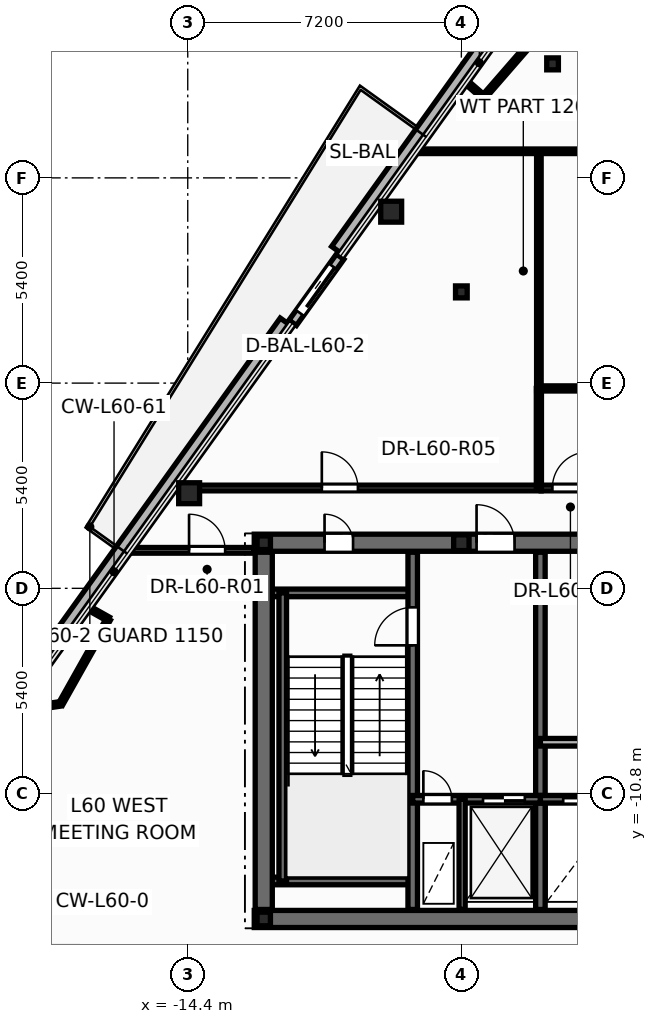
"""IFC4 building model, lengths in metres.
Left out: names, types, materials, properties, quantities, classifications, styles, units other than length and angle.
Written with IfcOpenShell. Run it as: python <this file> out.ifc"""

import sys

from ifc_helpers import new_model, si_unit, direction, frame, frame_2d, origin, origin_2d, place, context, subcontext, project, spatial, rectangle, hollow_circle, i_section, extrude, element, fill, save


model = new_model("IFC4")
c1 = context("Model", 3, precision=1e-05, world=origin(), true_north=direction((0.0, 1.0)))
c2 = subcontext(c1, "Body", "Model", "MODEL_VIEW")
j1 = project(units=[si_unit("LENGTHUNIT", "METRE"), si_unit("PLANEANGLEUNIT", "RADIAN")], contexts=[c1])
p1 = place(None, origin())
s1 = spatial("IfcSite", under=j1, at=p1, CompositionType="ELEMENT")
p2 = place(p1, origin())
s2 = spatial("IfcBuilding", under=s1, at=p2, CompositionType="ELEMENT")
p3 = place(p2, frame((0.0, 0.0, 228.9)))
s3 = spatial("IfcBuildingStorey", under=s2, at=p3, CompositionType="ELEMENT", Elevation=228.9)
for number, where, z_axis, x_axis in (
    (1, (-9.046, 4.51, 0.0), (0.0, 0.0, 1.0), (1.0, 0.0, 0.0)),
    (2, (-14.363, -2.897, 0.0), (0.0, 0.0, 1.0), (1.0, 0.0, 0.0)),
):
    element("IfcColumn", number, at=place(p3, frame(where, z_axis=z_axis, x_axis=x_axis)), inside=s3, PredefinedType="COLUMN", context=c2, shape_type="SweptSolid", body=[
        extrude(hollow_circle(Radius=0.275, WallThickness=0.024, at=origin_2d()), origin(), (0.0, 0.0, 1.0), 4.5),
    ])
for number, where, z_axis, x_axis in (
    (3, (-12.4, -14.1, 0.0), (0.0, 0.0, 1.0), (1.0, 0.0, 0.0)),
    (4, (-12.4, -4.2, 0.0), (0.0, 0.0, 1.0), (1.0, 0.0, 0.0)),
):
    element("IfcColumn", number, at=place(p3, frame(where, z_axis=z_axis, x_axis=x_axis)), inside=s3, PredefinedType="COLUMN", context=c2, shape_type="SweptSolid", body=[
        extrude(i_section(OverallWidth=0.352, OverallDepth=0.359, WebThickness=0.018, FlangeThickness=0.026, at=origin_2d()), origin(), (0.0, 0.0, 1.0), 4.5),
    ])
p4 = place(p3, frame((-7.2, -4.2, 0.0), z_axis=(0.0, 0.0, 1.0), x_axis=(1.0, 0.0, 0.0)))
e5 = element("IfcColumn", 5, at=p4, inside=s3, PredefinedType="PILASTER", context=c2, shape_type="SweptSolid", body=[
    extrude(i_section(OverallWidth=0.405, OverallDepth=0.414, WebThickness=0.022, FlangeThickness=0.032, at=origin_2d()), origin(), (0.0, 0.0, 1.0), 4.5),
])
for number, where, z_axis, x_axis in (
    (6, (-7.2, 2.4, 0.0), (0.0, 0.0, 1.0), (1.0, 0.0, 0.0)),
    (7, (-4.8, 8.4, 0.0), (0.0, 0.0, 1.0), (1.0, 0.0, 0.0)),
):
    element("IfcColumn", number, at=place(p3, frame(where, z_axis=z_axis, x_axis=x_axis)), inside=s3, PredefinedType="COLUMN", context=c2, shape_type="SweptSolid", body=[
        extrude(i_section(OverallWidth=0.307, OverallDepth=0.314, WebThickness=0.012, FlangeThickness=0.019, at=origin_2d()), origin(), (0.0, 0.0, 1.0), 4.5),
    ])
p5 = place(p3, frame((-3.248, 13.549, -0.2), z_axis=(0.0, 0.0, 1.0), x_axis=(-0.583104007924, -0.81239751104, 0.0)))
e8 = element("IfcWall", 8, at=p5, inside=s3, PredefinedType="PARAPET", context=c2, shape_type="SweptSolid", body=[
    extrude(rectangle(XDim=12.38, YDim=0.36, at=frame_2d((6.19, 0.0))), origin(), (0.0, 0.0, 1.0), 0.38),
])
p6 = place(p3, frame((-11.82, 1.607, -0.2), z_axis=(0.0, 0.0, 1.0), x_axis=(-0.58311922958, -0.812386585373, 0.0)))
e9 = element("IfcWall", 9, at=p6, inside=s3, PredefinedType="PARAPET", context=c2, shape_type="SweptSolid", body=[
    extrude(rectangle(XDim=15.948, YDim=0.36, at=frame_2d((7.974, 0.0))), origin(), (0.0, 0.0, 1.0), 0.38),
])
p7 = place(p3, frame((-10.39, 3.325, -0.015), z_axis=(0.0, 0.0, 1.0), x_axis=(-0.583092889468, -0.812405491274, 0.0)))
e10 = element("IfcWall", 10, at=p7, inside=s3, PredefinedType="STANDARD", context=c2, shape_type="SweptSolid", body=[
    extrude(rectangle(XDim=2.14, YDim=0.24, at=frame_2d((1.07, 0.0))), origin(), (0.0, 0.0, 1.0), 3.778),
])
p8 = place(p7, frame((0.32, 0.0, 0.015)))
e11 = element("IfcOpeningElement", 11, at=p8, cuts=e10, PredefinedType="OPENING", context=c2, shape_type="SweptSolid", body=[
    extrude(rectangle(XDim=1.506, YDim=2.204, at=frame_2d((0.75, 1.102))), frame((0.0, 0.13, 0.0), z_axis=(0.0, -1.0, 0.0), x_axis=(1.0, 0.0, 0.0)), (0.0, 0.0, 1.0), 0.26),
])
p9 = place(p3, frame((-12.65, -14.1, 0.0), z_axis=(0.0, 0.0, 1.0), x_axis=(1.0, 0.0, 0.0)))
e12 = element("IfcWall", 12, at=p9, inside=s3, PredefinedType="SHEAR", context=c2, shape_type="SweptSolid", body=[
    extrude(rectangle(XDim=25.3, YDim=0.45, at=frame_2d((12.65, 0.0))), origin(), (0.0, 0.0, 1.0), 4.5),
])
p10 = place(p3, frame((-12.65, -4.2, 0.0), z_axis=(0.0, 0.0, 1.0), x_axis=(1.0, 0.0, 0.0)))
e13 = element("IfcWall", 13, at=p10, inside=s3, PredefinedType="SHEAR", context=c2, shape_type="SweptSolid", body=[
    extrude(rectangle(XDim=25.3, YDim=0.45, at=frame_2d((12.65, 0.0))), origin(), (0.0, 0.0, 1.0), 4.5),
])
p11 = place(p10, frame((1.85, 0.0, 0.0)))
e14 = element("IfcOpeningElement", 14, at=p11, cuts=e13, PredefinedType="OPENING", context=c2, shape_type="SweptSolid", body=[
    extrude(rectangle(XDim=0.756, YDim=2.054, at=frame_2d((0.375, 1.027))), frame((0.0, 0.235, 0.0), z_axis=(0.0, -1.0, 0.0), x_axis=(1.0, 0.0, 0.0)), (0.0, 0.0, 1.0), 0.47),
])
p12 = place(p10, frame((22.65, 0.0, 0.0)))
e15 = element("IfcOpeningElement", 15, at=p12, cuts=e13, PredefinedType="OPENING", context=c2, shape_type="SweptSolid", body=[
    extrude(rectangle(XDim=0.756, YDim=2.054, at=frame_2d((0.375, 1.027))), frame((0.0, 0.235, 0.0), z_axis=(0.0, -1.0, 0.0), x_axis=(1.0, 0.0, 0.0)), (0.0, 0.0, 1.0), 0.47),
])
p13 = place(p10, frame((5.85, 0.0, 0.0)))
e16 = element("IfcOpeningElement", 16, at=p13, cuts=e13, PredefinedType="OPENING", context=c2, shape_type="SweptSolid", body=[
    extrude(rectangle(XDim=1.006, YDim=2.104, at=frame_2d((0.5, 1.052))), frame((0.0, 0.235, 0.0), z_axis=(0.0, -1.0, 0.0), x_axis=(1.0, 0.0, 0.0)), (0.0, 0.0, 1.0), 0.47),
])
p14 = place(p10, frame((10.35, 0.0, 0.0)))
e17 = element("IfcOpeningElement", 17, at=p14, cuts=e13, PredefinedType="OPENING", context=c2, shape_type="SweptSolid", body=[
    extrude(rectangle(XDim=1.406, YDim=2.154, at=frame_2d((0.7, 1.077))), frame((0.0, 0.235, 0.0), z_axis=(0.0, -1.0, 0.0), x_axis=(1.0, 0.0, 0.0)), (0.0, 0.0, 1.0), 0.47),
])
p15 = place(p10, frame((18.45, 0.0, 0.0)))
e18 = element("IfcOpeningElement", 18, at=p15, cuts=e13, PredefinedType="OPENING", context=c2, shape_type="SweptSolid", body=[
    extrude(rectangle(XDim=1.006, YDim=2.104, at=frame_2d((0.5, 1.052))), frame((0.0, 0.235, 0.0), z_axis=(0.0, -1.0, 0.0), x_axis=(1.0, 0.0, 0.0)), (0.0, 0.0, 1.0), 0.47),
])
for number, where, z_axis, x_axis in (
    (19, (-12.35, -5.52, 0.0), (0.0, 0.0, 1.0), (1.0, 0.0, 0.0)),
    (20, (-12.35, -13.1, 0.0), (0.0, 0.0, 1.0), (1.0, 0.0, 0.0)),
):
    element("IfcWall", number, at=place(p3, frame(where, z_axis=z_axis, x_axis=x_axis)), inside=s3, PredefinedType="SOLIDWALL", context=c2, shape_type="SweptSolid", body=[
        extrude(rectangle(XDim=3.87, YDim=0.2, at=frame_2d((1.935, 0.0))), origin(), (0.0, 0.0, 1.0), 4.5),
    ])
p16 = place(p3, frame((-11.9, -13.1, 0.0), z_axis=(0.0, 0.0, 1.0), x_axis=(0.0, 1.0, 0.0)))
e21 = element("IfcWall", 21, at=p16, inside=s3, PredefinedType="SOLIDWALL", context=c2, shape_type="SweptSolid", body=[
    extrude(rectangle(XDim=7.58, YDim=0.2, at=frame_2d((3.79, 0.0))), origin(), (0.0, 0.0, 1.0), 4.5),
])
p17 = place(p3, frame((-8.48, -13.85, 0.0), z_axis=(0.0, 0.0, 1.0), x_axis=(0.0, 1.0, 0.0)))
e22 = element("IfcWall", 22, at=p17, inside=s3, PredefinedType="SHEAR", context=c2, shape_type="SweptSolid", body=[
    extrude(rectangle(XDim=9.4, YDim=0.25, at=frame_2d((4.7, 0.0))), origin(), (0.0, 0.0, 1.0), 4.5),
])
p18 = place(p17, frame((6.95, 0.0, 0.0)))
e23 = element("IfcOpeningElement", 23, at=p18, cuts=e22, PredefinedType="OPENING", context=c2, shape_type="SweptSolid", body=[
    extrude(rectangle(XDim=1.006, YDim=2.104, at=frame_2d((0.5, 1.052))), frame((0.0, 0.135, 0.0), z_axis=(0.0, -1.0, 0.0), x_axis=(1.0, 0.0, 0.0)), (0.0, 0.0, 1.0), 0.27),
])
p19 = place(p3, frame((-5.12, -13.85, 0.0), z_axis=(0.0, 0.0, 1.0), x_axis=(0.0, 1.0, 0.0)))
e24 = element("IfcWall", 24, at=p19, inside=s3, PredefinedType="SHEAR", context=c2, shape_type="SweptSolid", body=[
    extrude(rectangle(XDim=9.4, YDim=0.25, at=frame_2d((4.7, 0.0))), origin(), (0.0, 0.0, 1.0), 4.5),
])
p20 = place(p3, frame((-8.48, -10.95, 0.0), z_axis=(0.0, 0.0, 1.0), x_axis=(1.0, 0.0, 0.0)))
e25 = element("IfcWall", 25, at=p20, inside=s3, PredefinedType="SOLIDWALL", context=c2, shape_type="SweptSolid", body=[
    extrude(rectangle(XDim=3.36, YDim=0.2, at=frame_2d((1.68, 0.0))), origin(), (0.0, 0.0, 1.0), 4.5),
])
p21 = place(p20, frame((0.28, 0.0, 0.0)))
e26 = element("IfcOpeningElement", 26, at=p21, cuts=e25, PredefinedType="OPENING", context=c2, shape_type="SweptSolid", body=[
    extrude(rectangle(XDim=0.756, YDim=2.054, at=frame_2d((0.375, 1.027))), frame((0.0, 0.11, 0.0), z_axis=(0.0, -1.0, 0.0), x_axis=(1.0, 0.0, 0.0)), (0.0, 0.0, 1.0), 0.22),
])
p22 = place(p20, frame((1.85, 0.0, 0.0)))
e27 = element("IfcOpeningElement", 27, at=p22, cuts=e25, PredefinedType="OPENING", context=c2, shape_type="SweptSolid", body=[
    extrude(rectangle(XDim=1.106, YDim=2.104, at=frame_2d((0.55, 1.052))), frame((0.0, 0.11, 0.0), z_axis=(0.0, -1.0, 0.0), x_axis=(1.0, 0.0, 0.0)), (0.0, 0.0, 1.0), 0.22),
])
p23 = place(p3, frame((-5.12, -10.95, 0.0), z_axis=(0.0, 0.0, 1.0), x_axis=(1.0, 0.0, 0.0)))
e28 = element("IfcWall", 28, at=p23, inside=s3, PredefinedType="SOLIDWALL", context=c2, shape_type="SweptSolid", body=[
    extrude(rectangle(XDim=10.24, YDim=0.2, at=frame_2d((5.12, 0.0))), origin(), (0.0, 0.0, 1.0), 4.5),
])
p24 = place(p23, frame((0.6, 0.0, 0.0)))
e29 = element("IfcOpeningElement", 29, at=p24, cuts=e28, PredefinedType="OPENING", context=c2, shape_type="SweptSolid", body=[
    extrude(rectangle(XDim=1.106, YDim=2.104, at=frame_2d((0.55, 1.052))), frame((0.0, 0.11, 0.0), z_axis=(0.0, -1.0, 0.0), x_axis=(1.0, 0.0, 0.0)), (0.0, 0.0, 1.0), 0.22),
])
p25 = place(p23, frame((2.67, 0.0, 0.0)))
e30 = element("IfcOpeningElement", 30, at=p25, cuts=e28, PredefinedType="OPENING", context=c2, shape_type="SweptSolid", body=[
    extrude(rectangle(XDim=1.106, YDim=2.104, at=frame_2d((0.55, 1.052))), frame((0.0, 0.11, 0.0), z_axis=(0.0, -1.0, 0.0), x_axis=(1.0, 0.0, 0.0)), (0.0, 0.0, 1.0), 0.22),
])
p26 = place(p23, frame((4.57, 0.0, 0.0)))
e31 = element("IfcOpeningElement", 31, at=p26, cuts=e28, PredefinedType="OPENING", context=c2, shape_type="SweptSolid", body=[
    extrude(rectangle(XDim=1.106, YDim=2.104, at=frame_2d((0.55, 1.052))), frame((0.0, 0.11, 0.0), z_axis=(0.0, -1.0, 0.0), x_axis=(1.0, 0.0, 0.0)), (0.0, 0.0, 1.0), 0.22),
])
p27 = place(p23, frame((6.47, 0.0, 0.0)))
e32 = element("IfcOpeningElement", 32, at=p27, cuts=e28, PredefinedType="OPENING", context=c2, shape_type="SweptSolid", body=[
    extrude(rectangle(XDim=1.106, YDim=2.104, at=frame_2d((0.55, 1.052))), frame((0.0, 0.11, 0.0), z_axis=(0.0, -1.0, 0.0), x_axis=(1.0, 0.0, 0.0)), (0.0, 0.0, 1.0), 0.22),
])
p28 = place(p23, frame((8.54, 0.0, 0.0)))
e33 = element("IfcOpeningElement", 33, at=p28, cuts=e28, PredefinedType="OPENING", context=c2, shape_type="SweptSolid", body=[
    extrude(rectangle(XDim=1.106, YDim=2.104, at=frame_2d((0.55, 1.052))), frame((0.0, 0.11, 0.0), z_axis=(0.0, -1.0, 0.0), x_axis=(1.0, 0.0, 0.0)), (0.0, 0.0, 1.0), 0.22),
])
p29 = place(p3, frame((-7.18, -13.85, 0.0), z_axis=(0.0, 0.0, 1.0), x_axis=(0.0, 1.0, 0.0)))
e34 = element("IfcWall", 34, at=p29, inside=s3, PredefinedType="PARTITIONING", context=c2, shape_type="SweptSolid", body=[
    extrude(rectangle(XDim=2.9, YDim=0.16, at=frame_2d((1.45, 0.0))), origin(), (0.0, 0.0, 1.0), 3.47),
])
p30 = place(p3, frame((-12.4, -13.85, 0.0), z_axis=(0.0, 0.0, 1.0), x_axis=(0.0, 1.0, 0.0)))
e35 = element("IfcWall", 35, at=p30, inside=s3, PredefinedType="SHEAR", context=c2, shape_type="SweptSolid", body=[
    extrude(rectangle(XDim=9.4, YDim=0.45, at=frame_2d((4.7, 0.0))), origin(), (0.0, 0.0, 1.0), 4.5),
])
p31 = place(p3, frame((-5.12, -9.45, 0.0), z_axis=(0.0, 0.0, 1.0), x_axis=(1.0, 0.0, 0.0)))
e36 = element("IfcWall", 36, at=p31, inside=s3, PredefinedType="SOLIDWALL", context=c2, shape_type="SweptSolid", body=[
    extrude(rectangle(XDim=2.24, YDim=0.2, at=frame_2d((1.12, 0.0))), origin(), (0.0, 0.0, 1.0), 4.245),
])
p32 = place(p3, frame((-14.757, -2.76, 0.0), z_axis=(0.0, 0.0, 1.0), x_axis=(1.0, 0.0, 0.0)))
e37 = element("IfcWall", 37, at=p32, inside=s3, PredefinedType="PARTITIONING", context=c2, shape_type="SweptSolid", body=[
    extrude(rectangle(XDim=9.657, YDim=0.15, at=frame_2d((4.829, 0.0))), origin(), (0.0, 0.0, 1.0), 3.22),
])
p33 = place(p32, frame((3.885, 0.0, 0.0)))
e38 = element("IfcOpeningElement", 38, at=p33, cuts=e37, PredefinedType="OPENING", context=c2, shape_type="SweptSolid", body=[
    extrude(rectangle(XDim=0.956, YDim=2.104, at=frame_2d((0.475, 1.052))), frame((0.0, 0.085, 0.0), z_axis=(0.0, -1.0, 0.0), x_axis=(1.0, 0.0, 0.0)), (0.0, 0.0, 1.0), 0.17),
])
p34 = place(p3, frame((-5.16, -0.2, 0.0), z_axis=(0.0, 0.0, 1.0), x_axis=(0.0, 1.0, 0.0)))
e39 = element("IfcWall", 39, at=p34, inside=s3, PredefinedType="PARTITIONING", context=c2, shape_type="SweptSolid", body=[
    extrude(rectangle(XDim=6.3, YDim=0.12, at=frame_2d((3.15, 0.0))), origin(), (0.0, 0.0, 1.0), 3.22),
])
p35 = place(p3, frame((-15.935, -4.4, 0.0), z_axis=(0.0, 0.0, 1.0), x_axis=(1.0, 0.0, 0.0)))
e40 = element("IfcWall", 40, at=p35, inside=s3, PredefinedType="PARTITIONING", context=c2, shape_type="SweptSolid", body=[
    extrude(rectangle(XDim=3.282, YDim=0.15, at=frame_2d((1.641, 0.0))), origin(), (0.0, 0.0, 1.0), 3.22),
])
p36 = place(p35, frame((1.569, 0.0, 0.0)))
e41 = element("IfcOpeningElement", 41, at=p36, cuts=e40, PredefinedType="OPENING", context=c2, shape_type="SweptSolid", body=[
    extrude(rectangle(XDim=0.956, YDim=2.104, at=frame_2d((0.475, 1.052))), frame((0.0, 0.085, 0.0), z_axis=(0.0, -1.0, 0.0), x_axis=(1.0, 0.0, 0.0)), (0.0, 0.0, 1.0), 0.17),
])
p37 = place(p3, frame((-8.398, 6.1, 0.0), z_axis=(0.0, 0.0, 1.0), x_axis=(1.0, 0.0, 0.0)))
e42 = element("IfcWall", 42, at=p37, inside=s3, PredefinedType="PARTITIONING", context=c2, shape_type="SweptSolid", body=[
    extrude(rectangle(XDim=6.038, YDim=0.12, at=frame_2d((3.019, 0.0))), origin(), (0.0, 0.0, 1.0), 3.22),
])
p38 = place(p3, frame((-5.098, -2.76, 0.0), z_axis=(0.0, 0.0, 1.0), x_axis=(1.0, 0.0, 0.0)))
e43 = element("IfcWall", 43, at=p38, inside=s3, PredefinedType="PARTITIONING", context=c2, shape_type="SweptSolid", body=[
    extrude(rectangle(XDim=2.738, YDim=0.15, at=frame_2d((1.369, 0.0))), origin(), (0.0, 0.0, 1.0), 3.865),
])
p39 = place(p38, frame((0.293, 0.0, 0.0)))
e44 = element("IfcOpeningElement", 44, at=p39, cuts=e43, PredefinedType="OPENING", context=c2, shape_type="SweptSolid", body=[
    extrude(rectangle(XDim=0.956, YDim=2.104, at=frame_2d((0.475, 1.052))), frame((0.0, 0.085, 0.0), z_axis=(0.0, -1.0, 0.0), x_axis=(1.0, 0.0, 0.0)), (0.0, 0.0, 1.0), 0.17),
])
p40 = place(p3, frame((-5.16, -0.14, 0.0), z_axis=(0.0, 0.0, 1.0), x_axis=(1.0, 0.0, 0.0)))
e45 = element("IfcWall", 45, at=p40, inside=s3, PredefinedType="PARTITIONING", context=c2, shape_type="SweptSolid", body=[
    extrude(rectangle(XDim=2.8, YDim=0.135, at=frame_2d((1.4, 0.0))), origin(), (0.0, 0.0, 1.0), 3.865),
])
p41 = place(p3, frame((-4.865, 9.537, 0.0), z_axis=(0.0, 0.0, 1.0), x_axis=(-0.656083508216, -0.754688300059, 0.0)))
e46 = element("IfcWall", 46, at=p41, inside=s3, PredefinedType="PARTITIONING", context=c2, shape_type="SweptSolid", body=[
    extrude(rectangle(XDim=2.667, YDim=0.12, at=frame_2d((1.333, 0.0))), origin(), (0.0, 0.0, 1.0), 4.245),
])
p42 = place(p3, frame((-5.16, -2.76, 0.0), z_axis=(0.0, 0.0, 1.0), x_axis=(0.0, 1.0, 0.0)))
e47 = element("IfcWall", 47, at=p42, inside=s3, PredefinedType="PARTITIONING", context=c2, shape_type="SweptSolid", body=[
    extrude(rectangle(XDim=2.62, YDim=0.135, at=frame_2d((1.31, 0.0))), origin(), (0.0, 0.0, 1.0), 4.245),
])
p43 = place(p3, frame((-16.488, -6.21, 0.0), z_axis=(0.0, 0.0, 1.0), x_axis=(-0.490329227995, -0.87153729018, 0.0)))
e48 = element("IfcWall", 48, at=p43, inside=s3, PredefinedType="PARTITIONING", context=c2, shape_type="SweptSolid", body=[
    extrude(rectangle(XDim=2.557, YDim=0.12, at=frame_2d((1.279, 0.0))), origin(), (0.0, 0.0, 1.0), 4.245),
])
p44 = place(p3, frame((-17.742, -8.439, 0.0), z_axis=(0.0, 0.0, 1.0), x_axis=(-0.989322448528, -0.145743242855, 0.0)))
e49 = element("IfcWall", 49, at=p44, inside=s3, PredefinedType="PARTITIONING", context=c2, shape_type="SweptSolid", body=[
    extrude(rectangle(XDim=0.846, YDim=0.12, at=frame_2d((0.423, 0.0))), origin(), (0.0, 0.0, 1.0), 3.763),
])
p45 = place(p3, frame((-6.615, 7.524, 0.0), z_axis=(0.0, 0.0, 1.0), x_axis=(-0.754777719291, 0.655980635737, 0.0)))
e50 = element("IfcWall", 50, at=p45, inside=s3, PredefinedType="PARTITIONING", context=c2, shape_type="SweptSolid", body=[
    extrude(rectangle(XDim=0.61, YDim=0.12, at=frame_2d((0.305, 0.0))), origin(), (0.0, 0.0, 1.0), 3.763),
])
p46 = place(p3, frame((-17.01, -5.916, 0.0), z_axis=(0.0, 0.0, 1.0), x_axis=(0.871532028392, -0.49033858046, 0.0)))
e51 = element("IfcWall", 51, at=p46, inside=s3, PredefinedType="PARTITIONING", context=c2, shape_type="SweptSolid", body=[
    extrude(rectangle(XDim=0.599, YDim=0.12, at=frame_2d((0.3, 0.0))), origin(), (0.0, 0.0, 1.0), 3.763),
])
p47 = place(p8, origin())
e52 = element("IfcDoor", 52, at=p47, inside=s3, OperationType="SLIDING_TO_RIGHT", PredefinedType="DOOR", context=c2, shape_type="SweptSolid", body=[
    extrude(rectangle(XDim=1.5, YDim=2.2, at=frame_2d((0.75, 1.1))), frame((0.0, 0.025, 0.0), z_axis=(0.0, -1.0, 0.0), x_axis=(1.0, 0.0, 0.0)), (0.0, 0.0, 1.0), 0.05),
])
fill(e11, e52)
p48 = place(p18, origin())
e53 = element("IfcDoor", 53, at=p48, inside=s3, OperationType="SINGLE_SWING_LEFT", PredefinedType="DOOR", context=c2, shape_type="SweptSolid", body=[
    extrude(rectangle(XDim=1.0, YDim=2.1, at=frame_2d((0.5, 1.05))), frame((0.0, 0.025, 0.0), z_axis=(0.0, -1.0, 0.0), x_axis=(1.0, 0.0, 0.0)), (0.0, 0.0, 1.0), 0.05),
])
fill(e23, e53)
p49 = place(p21, origin())
e54 = element("IfcDoor", 54, at=p49, inside=s3, OperationType="SINGLE_SWING_LEFT", PredefinedType="DOOR", context=c2, shape_type="SweptSolid", body=[
    extrude(rectangle(XDim=0.75, YDim=2.05, at=frame_2d((0.375, 1.025))), frame((0.0, 0.025, 0.0), z_axis=(0.0, -1.0, 0.0), x_axis=(1.0, 0.0, 0.0)), (0.0, 0.0, 1.0), 0.05),
])
fill(e26, e54)
p50 = place(p22, origin())
e55 = element("IfcDoor", 55, at=p50, inside=s3, OperationType="DOUBLE_DOOR_SLIDING", PredefinedType="DOOR", context=c2, shape_type="SweptSolid", body=[
    extrude(rectangle(XDim=1.1, YDim=2.1, at=frame_2d((0.55, 1.05))), frame((0.0, 0.025, 0.0), z_axis=(0.0, -1.0, 0.0), x_axis=(1.0, 0.0, 0.0)), (0.0, 0.0, 1.0), 0.05),
])
fill(e27, e55)
p51 = place(p24, origin())
e56 = element("IfcDoor", 56, at=p51, inside=s3, OperationType="DOUBLE_DOOR_SLIDING", PredefinedType="DOOR", context=c2, shape_type="SweptSolid", body=[
    extrude(rectangle(XDim=1.1, YDim=2.1, at=frame_2d((0.55, 1.05))), frame((0.0, 0.025, 0.0), z_axis=(0.0, -1.0, 0.0), x_axis=(1.0, 0.0, 0.0)), (0.0, 0.0, 1.0), 0.05),
])
fill(e29, e56)
p52 = place(p11, origin())
e57 = element("IfcDoor", 57, at=p52, inside=s3, OperationType="SINGLE_SWING_LEFT", PredefinedType="DOOR", context=c2, shape_type="SweptSolid", body=[
    extrude(rectangle(XDim=0.75, YDim=2.05, at=frame_2d((0.375, 1.025))), frame((0.0, 0.025, 0.0), z_axis=(0.0, -1.0, 0.0), x_axis=(1.0, 0.0, 0.0)), (0.0, 0.0, 1.0), 0.05),
])
fill(e14, e57)
p53 = place(p13, origin())
e58 = element("IfcDoor", 58, at=p53, inside=s3, OperationType="SINGLE_SWING_LEFT", PredefinedType="DOOR", context=c2, shape_type="SweptSolid", body=[
    extrude(rectangle(XDim=1.0, YDim=2.1, at=frame_2d((0.5, 1.05))), frame((0.0, 0.025, 0.0), z_axis=(0.0, -1.0, 0.0), x_axis=(1.0, 0.0, 0.0)), (0.0, 0.0, 1.0), 0.05),
])
fill(e16, e58)
p54 = place(p36, origin())
e59 = element("IfcDoor", 59, at=p54, inside=s3, OperationType="SINGLE_SWING_LEFT", PredefinedType="DOOR", context=c2, shape_type="SweptSolid", body=[
    extrude(rectangle(XDim=0.95, YDim=2.1, at=frame_2d((0.475, 1.05))), frame((0.0, 0.025, 0.0), z_axis=(0.0, -1.0, 0.0), x_axis=(1.0, 0.0, 0.0)), (0.0, 0.0, 1.0), 0.05),
])
fill(e41, e59)
p55 = place(p39, origin())
e60 = element("IfcDoor", 60, at=p55, inside=s3, OperationType="SINGLE_SWING_RIGHT", PredefinedType="DOOR", context=c2, shape_type="SweptSolid", body=[
    extrude(rectangle(XDim=0.95, YDim=2.1, at=frame_2d((0.475, 1.05))), frame((0.0, 0.025, 0.0), z_axis=(0.0, -1.0, 0.0), x_axis=(1.0, 0.0, 0.0)), (0.0, 0.0, 1.0), 0.05),
])
fill(e44, e60)
p56 = place(p33, origin())
e61 = element("IfcDoor", 61, at=p56, inside=s3, OperationType="SINGLE_SWING_LEFT", PredefinedType="DOOR", context=c2, shape_type="SweptSolid", body=[
    extrude(rectangle(XDim=0.95, YDim=2.1, at=frame_2d((0.475, 1.05))), frame((0.0, 0.025, 0.0), z_axis=(0.0, -1.0, 0.0), x_axis=(1.0, 0.0, 0.0)), (0.0, 0.0, 1.0), 0.05),
])
fill(e38, e61)
save(model, sys.argv[1])
